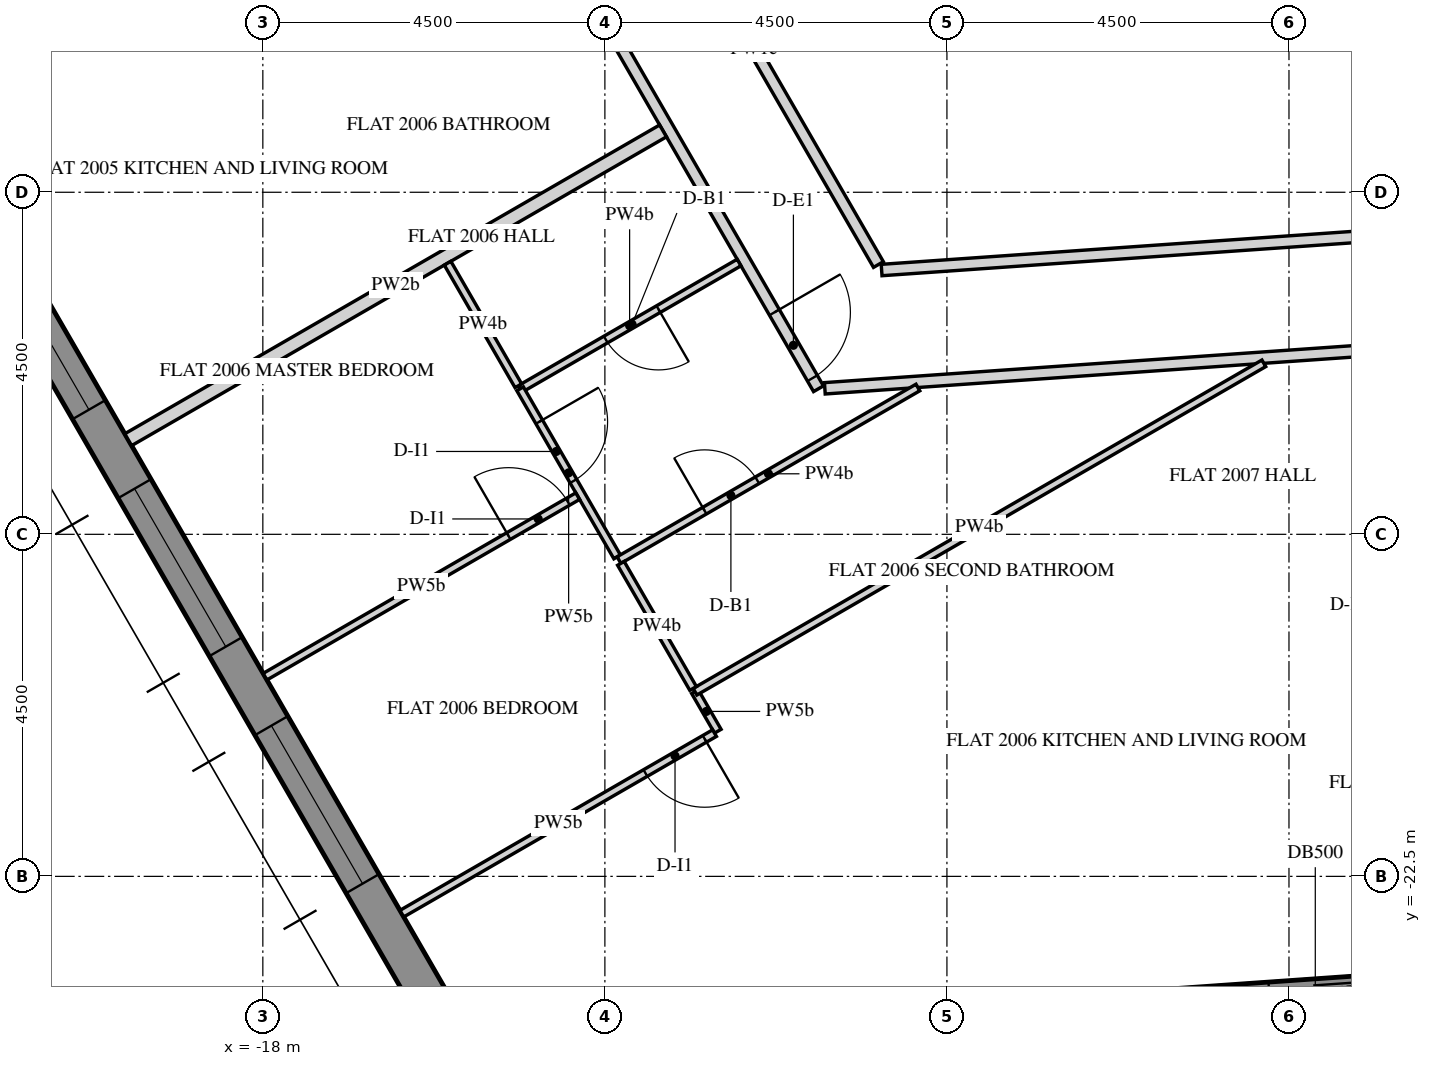
"""IFC4 building model, lengths in metres.
Left out: names, types, materials, properties, quantities, classifications, styles, units other than length and angle.
Written with IfcOpenShell. Run it as: python <this file> out.ifc"""

import sys

from ifc_helpers import new_model, si_unit, direction, frame, frame_2d, origin, place, context, subcontext, project, spatial, polyline, rectangle, outline, extrude, element, fill, save


model = new_model("IFC4")
c1 = context("Model", 3, precision=1e-05, world=origin(), true_north=direction((0.0, 1.0)))
c2 = subcontext(c1, "Body", "Model", "MODEL_VIEW")
j1 = project(units=[si_unit("LENGTHUNIT", "METRE"), si_unit("PLANEANGLEUNIT", "RADIAN")], contexts=[c1])
p1 = place(None, origin())
s1 = spatial("IfcSite", under=j1, at=p1, CompositionType="ELEMENT")
p2 = place(p1, origin())
s2 = spatial("IfcBuilding", under=s1, at=p2, CompositionType="ELEMENT")
p3 = place(p2, frame((0.0, 0.0, 260.1)))
s3 = spatial("IfcBuildingStorey", under=s2, at=p3, CompositionType="ELEMENT", Elevation=260.1)
p4 = place(p3, frame((-28.149, -2.745, -0.15), z_axis=(0.0, 0.0, 1.0), x_axis=(0.500003737743, -0.866023245787, 0.0)))
e1 = element("IfcWall", 1, at=p4, inside=s3, PredefinedType="SOLIDWALL", context=c2, shape_type="SweptSolid", body=[
    extrude(outline(polyline([(-0.021, -0.25), (25.468, -0.25), (25.421, 0.25), (0.021, 0.25), (-0.021, -0.25)])), origin(), (0.0, 0.0, 1.0), 3.9),
])
p5 = place(p4, frame((2.522, 0.0, 0.75)))
e2 = element("IfcOpeningElement", 2, at=p5, cuts=e1, PredefinedType="OPENING", context=c2, shape_type="SweptSolid", body=[
    extrude(rectangle(XDim=2.4, YDim=2.7, at=frame_2d((1.2, 1.35))), frame((0.0, 0.26, 0.0), z_axis=(0.0, -1.0, 0.0), x_axis=(1.0, 0.0, 0.0)), (0.0, 0.0, 1.0), 0.52),
])
p6 = place(p4, frame((6.122, 0.0, 0.75)))
e3 = element("IfcOpeningElement", 3, at=p6, cuts=e1, PredefinedType="OPENING", context=c2, shape_type="SweptSolid", body=[
    extrude(rectangle(XDim=2.4, YDim=2.7, at=frame_2d((1.2, 1.35))), frame((0.0, 0.26, 0.0), z_axis=(0.0, -1.0, 0.0), x_axis=(1.0, 0.0, 0.0)), (0.0, 0.0, 1.0), 0.52),
])
p7 = place(p4, frame((9.722, 0.0, 0.75)))
e4 = element("IfcOpeningElement", 4, at=p7, cuts=e1, PredefinedType="OPENING", context=c2, shape_type="SweptSolid", body=[
    extrude(rectangle(XDim=2.4, YDim=2.7, at=frame_2d((1.2, 1.35))), frame((0.0, 0.26, 0.0), z_axis=(0.0, -1.0, 0.0), x_axis=(1.0, 0.0, 0.0)), (0.0, 0.0, 1.0), 0.52),
])
p8 = place(p4, frame((13.323, 0.0, 0.75)))
e5 = element("IfcOpeningElement", 5, at=p8, cuts=e1, PredefinedType="OPENING", context=c2, shape_type="SweptSolid", body=[
    extrude(rectangle(XDim=2.4, YDim=2.7, at=frame_2d((1.2, 1.35))), frame((0.0, 0.26, 0.0), z_axis=(0.0, -1.0, 0.0), x_axis=(1.0, 0.0, 0.0)), (0.0, 0.0, 1.0), 0.52),
])
p9 = place(p4, frame((16.922, 0.0, 0.75)))
e6 = element("IfcOpeningElement", 6, at=p9, cuts=e1, PredefinedType="OPENING", context=c2, shape_type="SweptSolid", body=[
    extrude(rectangle(XDim=2.4, YDim=2.7, at=frame_2d((1.2, 1.35))), frame((0.0, 0.26, 0.0), z_axis=(0.0, -1.0, 0.0), x_axis=(1.0, 0.0, 0.0)), (0.0, 0.0, 1.0), 0.52),
])
p10 = place(p4, frame((20.522, 0.0, 0.75)))
e7 = element("IfcOpeningElement", 7, at=p10, cuts=e1, PredefinedType="OPENING", context=c2, shape_type="SweptSolid", body=[
    extrude(rectangle(XDim=2.4, YDim=2.7, at=frame_2d((1.2, 1.35))), frame((0.0, 0.26, 0.0), z_axis=(0.0, -1.0, 0.0), x_axis=(1.0, 0.0, 0.0)), (0.0, 0.0, 1.0), 0.52),
])
p11 = place(p3, frame((-10.86, -24.567, -0.15), z_axis=(0.0, 0.0, 1.0), x_axis=(0.997564329317, 0.06975248292, 0.0)))
e8 = element("IfcWall", 8, at=p11, inside=s3, PredefinedType="SOLIDWALL", context=c2, shape_type="SweptSolid", body=[
    extrude(outline(polyline([(0.25, -0.25), (22.795, -0.25), (23.295, 0.25), (-0.25, 0.25), (0.25, -0.25)])), origin(), (0.0, 0.0, 1.0), 3.9),
])
p12 = place(p11, frame((1.323, 0.0, 1.05)))
e9 = element("IfcOpeningElement", 9, at=p12, cuts=e8, PredefinedType="OPENING", context=c2, shape_type="SweptSolid", body=[
    extrude(rectangle(XDim=0.9, YDim=1.5, at=frame_2d((0.45, 0.75))), frame((0.0, 0.26, 0.0), z_axis=(0.0, -1.0, 0.0), x_axis=(1.0, 0.0, 0.0)), (0.0, 0.0, 1.0), 0.52),
])
p13 = place(p11, frame((2.522, 0.0, 0.15)))
e10 = element("IfcOpeningElement", 10, at=p13, cuts=e8, PredefinedType="OPENING", context=c2, shape_type="SweptSolid", body=[
    extrude(rectangle(XDim=1.2, YDim=2.4, at=frame_2d((0.6, 1.2))), frame((0.0, 0.26, 0.0), z_axis=(0.0, -1.0, 0.0), x_axis=(1.0, 0.0, 0.0)), (0.0, 0.0, 1.0), 0.52),
])
p14 = place(p11, frame((4.922, 0.0, 1.05)))
e11 = element("IfcOpeningElement", 11, at=p14, cuts=e8, PredefinedType="OPENING", context=c2, shape_type="SweptSolid", body=[
    extrude(rectangle(XDim=0.9, YDim=1.5, at=frame_2d((0.45, 0.75))), frame((0.0, 0.26, 0.0), z_axis=(0.0, -1.0, 0.0), x_axis=(1.0, 0.0, 0.0)), (0.0, 0.0, 1.0), 0.52),
])
p15 = place(p11, frame((6.122, 0.0, 0.15)))
e12 = element("IfcOpeningElement", 12, at=p15, cuts=e8, PredefinedType="OPENING", context=c2, shape_type="SweptSolid", body=[
    extrude(rectangle(XDim=1.2, YDim=2.4, at=frame_2d((0.6, 1.2))), frame((0.0, 0.26, 0.0), z_axis=(0.0, -1.0, 0.0), x_axis=(1.0, 0.0, 0.0)), (0.0, 0.0, 1.0), 0.52),
])
p16 = place(p11, frame((8.522, 0.0, 1.05)))
e13 = element("IfcOpeningElement", 13, at=p16, cuts=e8, PredefinedType="OPENING", context=c2, shape_type="SweptSolid", body=[
    extrude(rectangle(XDim=0.9, YDim=1.5, at=frame_2d((0.45, 0.75))), frame((0.0, 0.26, 0.0), z_axis=(0.0, -1.0, 0.0), x_axis=(1.0, 0.0, 0.0)), (0.0, 0.0, 1.0), 0.52),
])
p17 = place(p11, frame((9.722, 0.0, 0.15)))
e14 = element("IfcOpeningElement", 14, at=p17, cuts=e8, PredefinedType="OPENING", context=c2, shape_type="SweptSolid", body=[
    extrude(rectangle(XDim=1.2, YDim=2.4, at=frame_2d((0.6, 1.2))), frame((0.0, 0.26, 0.0), z_axis=(0.0, -1.0, 0.0), x_axis=(1.0, 0.0, 0.0)), (0.0, 0.0, 1.0), 0.52),
])
p18 = place(p11, frame((12.122, 0.0, 1.05)))
e15 = element("IfcOpeningElement", 15, at=p18, cuts=e8, PredefinedType="OPENING", context=c2, shape_type="SweptSolid", body=[
    extrude(rectangle(XDim=0.9, YDim=1.5, at=frame_2d((0.45, 0.75))), frame((0.0, 0.26, 0.0), z_axis=(0.0, -1.0, 0.0), x_axis=(1.0, 0.0, 0.0)), (0.0, 0.0, 1.0), 0.52),
])
p19 = place(p11, frame((13.323, 0.0, 0.15)))
e16 = element("IfcOpeningElement", 16, at=p19, cuts=e8, PredefinedType="OPENING", context=c2, shape_type="SweptSolid", body=[
    extrude(rectangle(XDim=1.2, YDim=2.4, at=frame_2d((0.6, 1.2))), frame((0.0, 0.26, 0.0), z_axis=(0.0, -1.0, 0.0), x_axis=(1.0, 0.0, 0.0)), (0.0, 0.0, 1.0), 0.52),
])
p20 = place(p11, frame((15.722, 0.0, 1.05)))
e17 = element("IfcOpeningElement", 17, at=p20, cuts=e8, PredefinedType="OPENING", context=c2, shape_type="SweptSolid", body=[
    extrude(rectangle(XDim=0.9, YDim=1.5, at=frame_2d((0.45, 0.75))), frame((0.0, 0.26, 0.0), z_axis=(0.0, -1.0, 0.0), x_axis=(1.0, 0.0, 0.0)), (0.0, 0.0, 1.0), 0.52),
])
p21 = place(p11, frame((16.922, 0.0, 0.15)))
e18 = element("IfcOpeningElement", 18, at=p21, cuts=e8, PredefinedType="OPENING", context=c2, shape_type="SweptSolid", body=[
    extrude(rectangle(XDim=1.2, YDim=2.4, at=frame_2d((0.6, 1.2))), frame((0.0, 0.26, 0.0), z_axis=(0.0, -1.0, 0.0), x_axis=(1.0, 0.0, 0.0)), (0.0, 0.0, 1.0), 0.52),
])
p22 = place(p11, frame((19.323, 0.0, 1.05)))
e19 = element("IfcOpeningElement", 19, at=p22, cuts=e8, PredefinedType="OPENING", context=c2, shape_type="SweptSolid", body=[
    extrude(rectangle(XDim=0.9, YDim=1.5, at=frame_2d((0.45, 0.75))), frame((0.0, 0.26, 0.0), z_axis=(0.0, -1.0, 0.0), x_axis=(1.0, 0.0, 0.0)), (0.0, 0.0, 1.0), 0.52),
])
p23 = place(p11, frame((20.522, 0.0, 0.15)))
e20 = element("IfcOpeningElement", 20, at=p23, cuts=e8, PredefinedType="OPENING", context=c2, shape_type="SweptSolid", body=[
    extrude(rectangle(XDim=1.2, YDim=2.4, at=frame_2d((0.6, 1.2))), frame((0.0, 0.26, 0.0), z_axis=(0.0, -1.0, 0.0), x_axis=(1.0, 0.0, 0.0)), (0.0, 0.0, 1.0), 0.52),
])
p24 = place(p3, frame((-18.338, -2.838, 0.0), z_axis=(0.0, 0.0, 1.0), x_axis=(0.499999693481, -0.866025580753, 0.0)))
e21 = element("IfcWall", 21, at=p24, inside=s3, PredefinedType="PARTITIONING", context=c2, shape_type="SweptSolid", body=[
    extrude(rectangle(XDim=15.296, YDim=0.15, at=frame_2d((7.648, 0.0))), origin(), (0.0, 0.0, 1.0), 2.823),
])
p25 = place(p24, frame((2.925, 0.0, 0.0)))
e22 = element("IfcOpeningElement", 22, at=p25, cuts=e21, PredefinedType="OPENING", context=c2, shape_type="SweptSolid", body=[
    extrude(rectangle(XDim=1.0, YDim=2.1, at=frame_2d((0.5, 1.05))), frame((0.0, 0.085, 0.0), z_axis=(0.0, -1.0, 0.0), x_axis=(1.0, 0.0, 0.0)), (0.0, 0.0, 1.0), 0.17),
])
p26 = place(p24, frame((14.136, 0.0, 0.0)))
e23 = element("IfcOpeningElement", 23, at=p26, cuts=e21, PredefinedType="OPENING", context=c2, shape_type="SweptSolid", body=[
    extrude(rectangle(XDim=1.0, YDim=2.1, at=frame_2d((0.5, 1.05))), frame((0.0, 0.085, 0.0), z_axis=(0.0, -1.0, 0.0), x_axis=(1.0, 0.0, 0.0)), (0.0, 0.0, 1.0), 0.17),
])
p27 = place(p3, frame((-10.606, -16.079, 0.0), z_axis=(0.0, 0.0, 1.0), x_axis=(0.997563356349, 0.069766396426, 0.0)))
e24 = element("IfcWall", 24, at=p27, inside=s3, PredefinedType="PARTITIONING", context=c2, shape_type="SweptSolid", body=[
    extrude(rectangle(XDim=17.273, YDim=0.15, at=frame_2d((8.636, 0.0))), origin(), (0.0, 0.0, 1.0), 2.823),
])
p28 = place(p27, frame((7.478, 0.0, 0.0)))
e25 = element("IfcOpeningElement", 25, at=p28, cuts=e24, PredefinedType="OPENING", context=c2, shape_type="SweptSolid", body=[
    extrude(rectangle(XDim=1.0, YDim=2.1, at=frame_2d((0.5, 1.05))), frame((0.0, 0.085, 0.0), z_axis=(0.0, -1.0, 0.0), x_axis=(1.0, 0.0, 0.0)), (0.0, 0.0, 1.0), 0.17),
])
p29 = place(p3, frame((7.051, -13.341, 0.0), z_axis=(0.0, 0.0, 1.0), x_axis=(-0.997563599815, -0.069762915103, 0.0)))
e26 = element("IfcWall", 26, at=p29, inside=s3, PredefinedType="PARTITIONING", context=c2, shape_type="SweptSolid", body=[
    extrude(rectangle(XDim=16.952, YDim=0.15, at=frame_2d((8.476, 0.0))), origin(), (0.0, 0.0, 1.0), 2.823),
])
p30 = place(p29, frame((8.026, 0.0, 0.0)))
e27 = element("IfcOpeningElement", 27, at=p30, cuts=e26, PredefinedType="OPENING", context=c2, shape_type="SweptSolid", body=[
    extrude(rectangle(XDim=0.9, YDim=2.1, at=frame_2d((0.45, 1.05))), frame((0.0, 0.085, 0.0), z_axis=(0.0, -1.0, 0.0), x_axis=(1.0, 0.0, 0.0)), (0.0, 0.0, 1.0), 0.17),
])
p31 = place(p3, frame((-9.901, -14.451, 0.0), z_axis=(0.0, 0.0, 1.0), x_axis=(-0.49999161165, 0.866030246746, 0.0)))
e28 = element("IfcWall", 28, at=p31, inside=s3, PredefinedType="PARTITIONING", context=c2, shape_type="SweptSolid", body=[
    extrude(rectangle(XDim=6.543, YDim=0.15, at=frame_2d((3.271, 0.0))), origin(), (0.0, 0.0, 1.0), 2.823),
])
p32 = place(p3, frame((-19.771, -16.755, 0.0), z_axis=(0.0, 0.0, 1.0), x_axis=(0.866022959057, 0.500004234368, 0.0)))
e29 = element("IfcWall", 29, at=p32, inside=s3, PredefinedType="PARTITIONING", context=c2, shape_type="SweptSolid", body=[
    extrude(rectangle(XDim=8.125, YDim=0.18, at=frame_2d((4.062, 0.0))), origin(), (0.0, 0.0, 1.0), 2.823),
])
p33 = place(p3, frame((-12.315, -20.069, 0.0), z_axis=(0.0, 0.0, 1.0), x_axis=(0.500108649621, -0.865962665808, 0.0)))
e30 = element("IfcWall", 30, at=p33, inside=s3, PredefinedType="PARTITIONING", context=c2, shape_type="SweptSolid", body=[
    extrude(rectangle(XDim=0.602, YDim=0.1, at=frame_2d((0.301, 0.0))), origin(), (0.0, 0.0, 1.0), 2.823),
])
p34 = place(p3, frame((-12.058, -20.615, 0.0), z_axis=(0.0, 0.0, 1.0), x_axis=(-0.866020389056, -0.500008685663, 0.0)))
e31 = element("IfcWall", 31, at=p34, inside=s3, PredefinedType="PARTITIONING", context=c2, shape_type="SweptSolid", body=[
    extrude(rectangle(XDim=4.75, YDim=0.1, at=frame_2d((2.375, 0.0))), origin(), (0.0, 0.0, 1.0), 2.823),
])
p35 = place(p34, frame((0.15, 0.0, 0.0)))
e32 = element("IfcOpeningElement", 32, at=p35, cuts=e31, PredefinedType="OPENING", context=c2, shape_type="SweptSolid", body=[
    extrude(rectangle(XDim=0.9, YDim=2.1, at=frame_2d((0.45, 1.05))), frame((0.0, 0.06, 0.0), z_axis=(0.0, -1.0, 0.0), x_axis=(1.0, 0.0, 0.0)), (0.0, 0.0, 1.0), 0.12),
])
p36 = place(p3, frame((-4.831, -15.75, 0.0), z_axis=(0.0, 0.0, 1.0), x_axis=(-0.866012441049, -0.500022451445, 0.0)))
e33 = element("IfcWall", 33, at=p36, inside=s3, PredefinedType="PARTITIONING", context=c2, shape_type="SweptSolid", body=[
    extrude(rectangle(XDim=8.641, YDim=0.1, at=frame_2d((4.321, 0.0))), origin(), (0.0, 0.0, 1.0), 2.823),
])
p37 = place(p3, frame((-11.735, -14.425, 0.0), z_axis=(0.0, 0.0, 1.0), x_axis=(-0.866033959199, -0.499985181294, 0.0)))
e34 = element("IfcWall", 34, at=p37, inside=s3, PredefinedType="PARTITIONING", context=c2, shape_type="SweptSolid", body=[
    extrude(rectangle(XDim=3.325, YDim=0.1, at=frame_2d((1.662, 0.0))), origin(), (0.0, 0.0, 1.0), 2.823),
])
p38 = place(p37, frame((1.225, 0.0, 0.0)))
e35 = element("IfcOpeningElement", 35, at=p38, cuts=e34, PredefinedType="OPENING", context=c2, shape_type="SweptSolid", body=[
    extrude(rectangle(XDim=0.8, YDim=2.1, at=frame_2d((0.4, 1.05))), frame((0.0, 0.06, 0.0), z_axis=(0.0, -1.0, 0.0), x_axis=(1.0, 0.0, 0.0)), (0.0, 0.0, 1.0), 0.12),
])
p39 = place(p3, frame((-14.615, -16.085, 0.0), z_axis=(0.0, 0.0, 1.0), x_axis=(0.499943114462, -0.866058244174, 0.0)))
e36 = element("IfcWall", 36, at=p39, inside=s3, PredefinedType="PARTITIONING", context=c2, shape_type="SweptSolid", body=[
    extrude(rectangle(XDim=2.554, YDim=0.1, at=frame_2d((1.277, 0.0))), origin(), (0.0, 0.0, 1.0), 2.823),
])
p40 = place(p39, frame((0.502, 0.0, 0.0)))
e37 = element("IfcOpeningElement", 37, at=p40, cuts=e36, PredefinedType="OPENING", context=c2, shape_type="SweptSolid", body=[
    extrude(rectangle(XDim=0.9, YDim=2.1, at=frame_2d((0.45, 1.05))), frame((0.0, 0.06, 0.0), z_axis=(0.0, -1.0, 0.0), x_axis=(1.0, 0.0, 0.0)), (0.0, 0.0, 1.0), 0.12),
])
p41 = place(p3, frame((-13.314, -18.339, 0.0), z_axis=(0.0, 0.0, 1.0), x_axis=(0.866020827114, 0.500007926942, 0.0)))
e38 = element("IfcWall", 38, at=p41, inside=s3, PredefinedType="PARTITIONING", context=c2, shape_type="SweptSolid", body=[
    extrude(rectangle(XDim=4.541, YDim=0.1, at=frame_2d((2.27, 0.0))), origin(), (0.0, 0.0, 1.0), 2.823),
])
p42 = place(p41, frame((1.3, 0.0, 0.0)))
e39 = element("IfcOpeningElement", 39, at=p42, cuts=e38, PredefinedType="OPENING", context=c2, shape_type="SweptSolid", body=[
    extrude(rectangle(XDim=0.8, YDim=2.1, at=frame_2d((0.4, 1.05))), frame((0.0, 0.06, 0.0), z_axis=(0.0, -1.0, 0.0), x_axis=(1.0, 0.0, 0.0)), (0.0, 0.0, 1.0), 0.12),
])
p43 = place(p3, frame((-15.569, -14.433, 0.0), z_axis=(0.0, 0.0, 1.0), x_axis=(0.499960808225, -0.866048029984, 0.0)))
e40 = element("IfcWall", 40, at=p43, inside=s3, PredefinedType="PARTITIONING", context=c2, shape_type="SweptSolid", body=[
    extrude(rectangle(XDim=1.862, YDim=0.1, at=frame_2d((0.931, 0.0))), origin(), (0.0, 0.0, 1.0), 2.823),
])
p44 = place(p3, frame((-17.971, -19.873, 0.0), z_axis=(0.0, 0.0, 1.0), x_axis=(0.866020389056, 0.500008685663, 0.0)))
e41 = element("IfcWall", 41, at=p44, inside=s3, PredefinedType="PARTITIONING", context=c2, shape_type="SweptSolid", body=[
    extrude(rectangle(XDim=4.75, YDim=0.1, at=frame_2d((2.375, 0.0))), origin(), (0.0, 0.0, 1.0), 2.823),
])
p45 = place(p44, frame((3.7, 0.0, 0.0)))
e42 = element("IfcOpeningElement", 42, at=p45, cuts=e41, PredefinedType="OPENING", context=c2, shape_type="SweptSolid", body=[
    extrude(rectangle(XDim=0.9, YDim=2.1, at=frame_2d((0.45, 1.05))), frame((0.0, 0.06, 0.0), z_axis=(0.0, -1.0, 0.0), x_axis=(1.0, 0.0, 0.0)), (0.0, 0.0, 1.0), 0.12),
])
p46 = place(p3, frame((-12.339, -20.028, 0.0), z_axis=(0.0, 0.0, 1.0), x_axis=(-0.500022797313, 0.86601224135, 0.0)))
e43 = element("IfcWall", 43, at=p46, inside=s3, PredefinedType="PARTITIONING", context=c2, shape_type="SweptSolid", body=[
    extrude(rectangle(XDim=1.9, YDim=0.1, at=frame_2d((0.95, 0.0))), origin(), (0.0, 0.0, 1.0), 2.823),
])
p47 = place(p8, frame((0.0, 0.18, 0.0)))
e44 = element("IfcWindow", 44, at=p47, inside=s3, PartitioningType="DOUBLE_PANEL_VERTICAL", PredefinedType="WINDOW", context=c2, shape_type="SweptSolid", body=[
    extrude(rectangle(XDim=2.4, YDim=2.7, at=frame_2d((1.2, 1.35))), frame((0.0, 0.03, 0.0), z_axis=(0.0, -1.0, 0.0), x_axis=(1.0, 0.0, 0.0)), (0.0, 0.0, 1.0), 0.06),
])
fill(e5, e44)
p48 = place(p9, frame((0.0, 0.18, 0.0)))
e45 = element("IfcWindow", 45, at=p48, inside=s3, PartitioningType="DOUBLE_PANEL_VERTICAL", PredefinedType="WINDOW", context=c2, shape_type="SweptSolid", body=[
    extrude(rectangle(XDim=2.4, YDim=2.7, at=frame_2d((1.2, 1.35))), frame((0.0, 0.03, 0.0), z_axis=(0.0, -1.0, 0.0), x_axis=(1.0, 0.0, 0.0)), (0.0, 0.0, 1.0), 0.06),
])
fill(e6, e45)
p49 = place(p10, frame((0.0, 0.18, 0.0)))
e46 = element("IfcWindow", 46, at=p49, inside=s3, PartitioningType="DOUBLE_PANEL_VERTICAL", PredefinedType="WINDOW", context=c2, shape_type="SweptSolid", body=[
    extrude(rectangle(XDim=2.4, YDim=2.7, at=frame_2d((1.2, 1.35))), frame((0.0, 0.03, 0.0), z_axis=(0.0, -1.0, 0.0), x_axis=(1.0, 0.0, 0.0)), (0.0, 0.0, 1.0), 0.06),
])
fill(e7, e46)
p50 = place(p15, frame((0.0, 0.175, 0.0)))
e47 = element("IfcDoor", 47, at=p50, inside=s3, OperationType="SLIDING_TO_LEFT", PredefinedType="DOOR", context=c2, shape_type="SweptSolid", body=[
    extrude(rectangle(XDim=1.2, YDim=2.4, at=frame_2d((0.6, 1.2))), frame((0.0, 0.025, 0.0), z_axis=(0.0, -1.0, 0.0), x_axis=(1.0, 0.0, 0.0)), (0.0, 0.0, 1.0), 0.05),
])
fill(e12, e47)
p51 = place(p26, origin())
e48 = element("IfcDoor", 48, at=p51, inside=s3, OperationType="SINGLE_SWING_LEFT", PredefinedType="DOOR", context=c2, shape_type="SweptSolid", body=[
    extrude(rectangle(XDim=1.0, YDim=2.1, at=frame_2d((0.5, 1.05))), frame((0.0, 0.025, 0.0), z_axis=(0.0, -1.0, 0.0), x_axis=(1.0, 0.0, 0.0)), (0.0, 0.0, 1.0), 0.05),
])
fill(e23, e48)
p52 = place(p38, origin())
e49 = element("IfcDoor", 49, at=p52, inside=s3, OperationType="SINGLE_SWING_RIGHT", PredefinedType="DOOR", context=c2, shape_type="SweptSolid", body=[
    extrude(rectangle(XDim=0.8, YDim=2.1, at=frame_2d((0.4, 1.05))), frame((0.0, 0.025, 0.0), z_axis=(0.0, -1.0, 0.0), x_axis=(1.0, 0.0, 0.0)), (0.0, 0.0, 1.0), 0.05),
])
fill(e35, e49)
p53 = place(p40, origin())
e50 = element("IfcDoor", 50, at=p53, inside=s3, OperationType="SINGLE_SWING_LEFT", PredefinedType="DOOR", context=c2, shape_type="SweptSolid", body=[
    extrude(rectangle(XDim=0.9, YDim=2.1, at=frame_2d((0.45, 1.05))), frame((0.0, 0.025, 0.0), z_axis=(0.0, -1.0, 0.0), x_axis=(1.0, 0.0, 0.0)), (0.0, 0.0, 1.0), 0.05),
])
fill(e37, e50)
p54 = place(p45, origin())
e51 = element("IfcDoor", 51, at=p54, inside=s3, OperationType="SINGLE_SWING_RIGHT", PredefinedType="DOOR", context=c2, shape_type="SweptSolid", body=[
    extrude(rectangle(XDim=0.9, YDim=2.1, at=frame_2d((0.45, 1.05))), frame((0.0, 0.025, 0.0), z_axis=(0.0, -1.0, 0.0), x_axis=(1.0, 0.0, 0.0)), (0.0, 0.0, 1.0), 0.05),
])
fill(e42, e51)
p55 = place(p35, origin())
e52 = element("IfcDoor", 52, at=p55, inside=s3, OperationType="SINGLE_SWING_RIGHT", PredefinedType="DOOR", context=c2, shape_type="SweptSolid", body=[
    extrude(rectangle(XDim=0.9, YDim=2.1, at=frame_2d((0.45, 1.05))), frame((0.0, 0.025, 0.0), z_axis=(0.0, -1.0, 0.0), x_axis=(1.0, 0.0, 0.0)), (0.0, 0.0, 1.0), 0.05),
])
fill(e32, e52)
p56 = place(p42, origin())
e53 = element("IfcDoor", 53, at=p56, inside=s3, OperationType="SINGLE_SWING_RIGHT", PredefinedType="DOOR", context=c2, shape_type="SweptSolid", body=[
    extrude(rectangle(XDim=0.8, YDim=2.1, at=frame_2d((0.4, 1.05))), frame((0.0, 0.025, 0.0), z_axis=(0.0, -1.0, 0.0), x_axis=(1.0, 0.0, 0.0)), (0.0, 0.0, 1.0), 0.05),
])
fill(e39, e53)
save(model, sys.argv[1])
